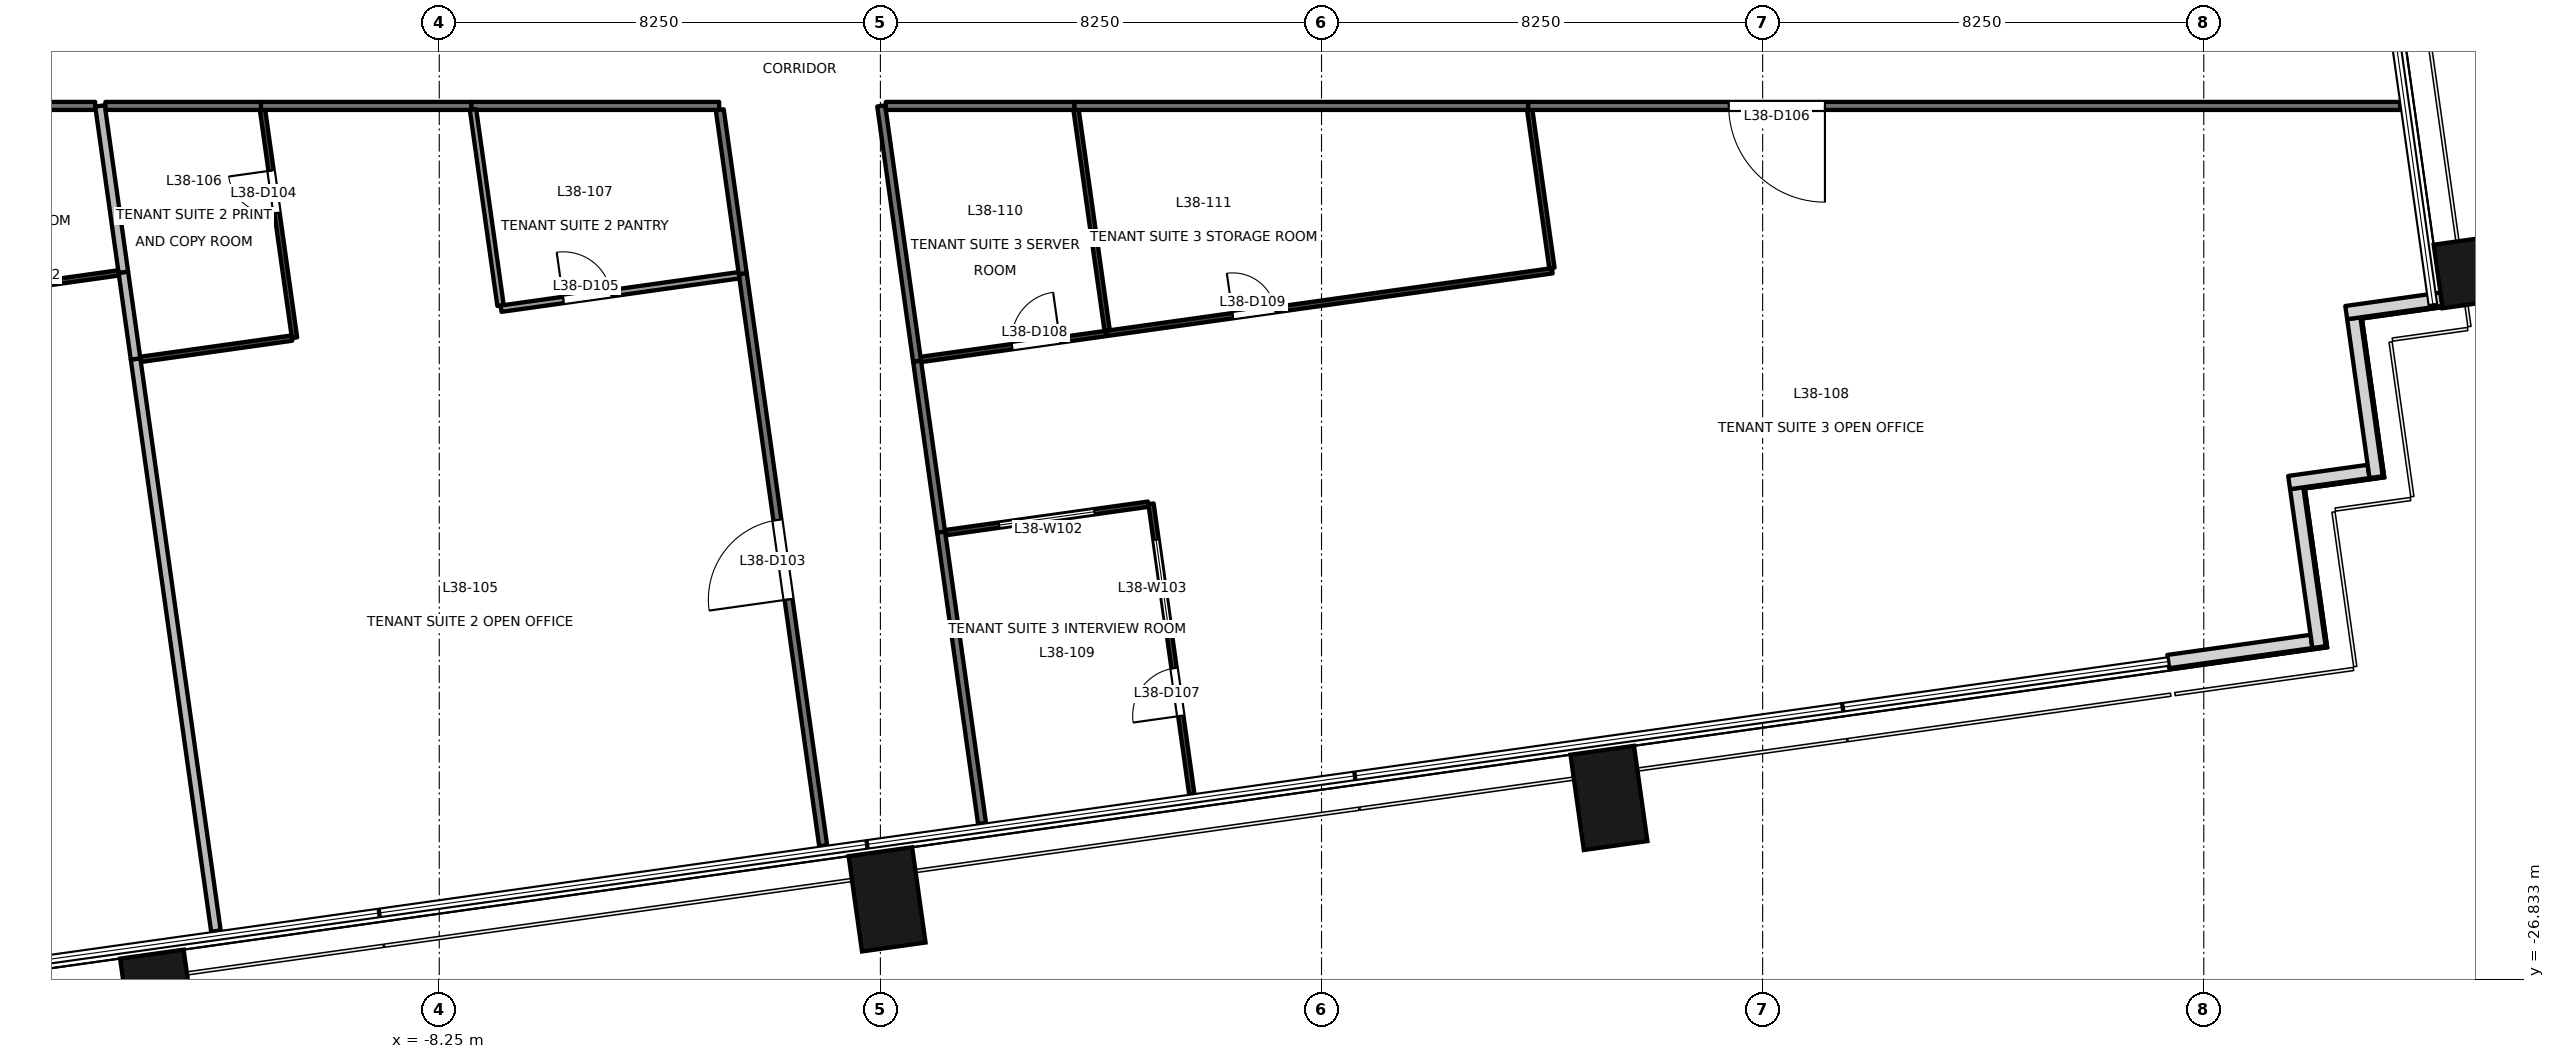
"""IFC4 building model, lengths in metres.
Left out: names, types, materials, properties, quantities, classifications, styles, units other than length and angle.
Written with IfcOpenShell. Run it as: python <this file> out.ifc"""

import sys

from ifc_helpers import new_model, si_unit, direction, frame, frame_2d, origin, origin_2d, place, context, subcontext, project, spatial, rectangle, extrude, element, fill, save


model = new_model("IFC4")
c1 = context("Model", 3, precision=1e-05, world=origin(), true_north=direction((0.0, 1.0)))
c2 = subcontext(c1, "Body", "Model", "MODEL_VIEW")
j1 = project(units=[si_unit("LENGTHUNIT", "METRE"), si_unit("PLANEANGLEUNIT", "RADIAN")], contexts=[c1])
p1 = place(None, origin())
s1 = spatial("IfcSite", under=j1, at=p1, CompositionType="ELEMENT")
p2 = place(p1, origin())
s2 = spatial("IfcBuilding", under=s1, at=p2, CompositionType="ELEMENT")
p3 = place(p2, frame((0.0, 0.0, 168.5)))
s3 = spatial("IfcBuildingStorey", under=s2, at=p3, CompositionType="ELEMENT", Elevation=168.5)
for number, where, z_axis, x_axis in (
    (1, (-13.5, -27.256, -0.2), (0.0, 0.0, 1.0), (0.99, 0.139, 0.0)),
    (2, (0.125, -25.34, -0.2), (0.0, 0.0, 1.0), (0.99, 0.139, 0.0)),
    (3, (13.625, -23.443, -0.2), (0.0, 0.0, 1.0), (0.99, 0.139, 0.0)),
    (4, (30.024, -13.565, -0.2), (0.0, 0.0, 1.0), (-0.139, 0.99, 0.0)),
):
    element("IfcColumn", number, at=place(p3, frame(where, z_axis=z_axis, x_axis=x_axis)), inside=s3, PredefinedType="COLUMN", context=c2, shape_type="SweptSolid", body=[
        extrude(rectangle(XDim=1.2, YDim=1.8, at=origin_2d()), origin(), (0.0, 0.0, 1.0), 3.9),
    ])
p4 = place(p3, frame((24.085, -20.893, 0.0), z_axis=(0.0, 0.0, 1.0), x_axis=(0.990255800966, 0.139260362823, 0.0)))
e5 = element("IfcWall", 5, at=p4, inside=s3, PredefinedType="SOLIDWALL", context=c2, shape_type="SweptSolid", body=[
    extrude(rectangle(XDim=2.705, YDim=0.25, at=frame_2d((1.353, 0.0))), origin(), (0.0, 0.0, 1.0), 3.7),
])
p5 = place(p3, frame((26.905, -20.622, 0.0), z_axis=(0.0, 0.0, 1.0), x_axis=(-0.139313431826, 0.990248336385, 0.0)))
e6 = element("IfcWall", 6, at=p5, inside=s3, PredefinedType="SOLIDWALL", context=c2, shape_type="SweptSolid", body=[
    extrude(rectangle(XDim=3.0, YDim=0.25, at=frame_2d((1.5, 0.0))), origin(), (0.0, 0.0, 1.0), 3.7),
])
p6 = place(p3, frame((26.346, -17.544, 0.0), z_axis=(0.0, 0.0, 1.0), x_axis=(0.990368090482, 0.13845954411, 0.0)))
e7 = element("IfcWall", 7, at=p6, inside=s3, PredefinedType="SOLIDWALL", context=c2, shape_type="SweptSolid", body=[
    extrude(rectangle(XDim=1.5, YDim=0.25, at=frame_2d((0.75, 0.0))), origin(), (0.0, 0.0, 1.0), 3.7),
])
p7 = place(p3, frame((27.973, -17.443, 0.0), z_axis=(0.0, 0.0, 1.0), x_axis=(-0.139313431826, 0.990248336385, 0.0)))
e8 = element("IfcWall", 8, at=p7, inside=s3, PredefinedType="SOLIDWALL", context=c2, shape_type="SweptSolid", body=[
    extrude(rectangle(XDim=3.0, YDim=0.25, at=frame_2d((1.5, 0.0))), origin(), (0.0, 0.0, 1.0), 3.7),
])
p8 = place(p3, frame((27.414, -14.366, 0.0), z_axis=(0.0, 0.0, 1.0), x_axis=(0.990256286673, 0.139256908998, 0.0)))
e9 = element("IfcWall", 9, at=p8, inside=s3, PredefinedType="SOLIDWALL", context=c2, shape_type="SweptSolid", body=[
    extrude(rectangle(XDim=1.801, YDim=0.25, at=frame_2d((0.9, 0.0))), origin(), (0.0, 0.0, 1.0), 3.7),
])
p9 = place(p3, frame((-14.684, -10.5, 0.0), z_axis=(0.0, 0.0, 1.0), x_axis=(-1.0, 0.0, 0.0)))
e10 = element("IfcWall", 10, at=p9, inside=s3, PredefinedType="PARTITIONING", context=c2, shape_type="SweptSolid", body=[
    extrude(rectangle(XDim=4.882, YDim=0.15, at=frame_2d((2.441, 0.0))), origin(), (0.0, 0.0, 1.0), 3.7),
])
p10 = place(p3, frame((-7.648, -10.5, 0.0), z_axis=(0.0, 0.0, 1.0), x_axis=(-1.0, 0.0, 0.0)))
e11 = element("IfcWall", 11, at=p10, inside=s3, PredefinedType="PARTITIONING", context=c2, shape_type="SweptSolid", body=[
    extrude(rectangle(XDim=3.938, YDim=0.15, at=frame_2d((1.969, 0.0))), origin(), (0.0, 0.0, 1.0), 2.8),
])
p11 = place(p3, frame((-1.07, -24.337, 0.0), z_axis=(0.0, 0.0, 1.0), x_axis=(-0.139184552649, 0.990266459244, 0.0)))
e12 = element("IfcWall", 12, at=p11, inside=s3, PredefinedType="PARTITIONING", context=c2, shape_type="SweptSolid", body=[
    extrude(rectangle(XDim=10.805, YDim=0.15, at=frame_2d((5.403, 0.0))), origin(), (0.0, 0.0, 1.0), 3.7),
])
p12 = place(p11, frame((4.652, 0.0, 0.0)))
e13 = element("IfcOpeningElement", 13, at=p12, cuts=e12, PredefinedType="OPENING", context=c2, shape_type="SweptSolid", body=[
    extrude(rectangle(XDim=1.5, YDim=2.1, at=frame_2d((0.75, 1.05))), frame((0.0, 0.085, 0.0), z_axis=(0.0, -1.0, 0.0), x_axis=(1.0, 0.0, 0.0)), (0.0, 0.0, 1.0), 0.171),
])
p13 = place(p3, frame((-11.586, -10.5, 0.0), z_axis=(0.0, 0.0, 1.0), x_axis=(-1.0, 0.0, 0.0)))
e14 = element("IfcWall", 14, at=p13, inside=s3, PredefinedType="PARTITIONING", context=c2, shape_type="SweptSolid", body=[
    extrude(rectangle(XDim=2.908, YDim=0.15, at=frame_2d((1.454, 0.0))), origin(), (0.0, 0.0, 1.0), 2.8),
])
p14 = place(p3, frame((-3.015, -10.5, 0.0), z_axis=(0.0, 0.0, 1.0), x_axis=(-1.0, 0.0, 0.0)))
e15 = element("IfcWall", 15, at=p14, inside=s3, PredefinedType="PARTITIONING", context=c2, shape_type="SweptSolid", body=[
    extrude(rectangle(XDim=4.633, YDim=0.15, at=frame_2d((2.316, 0.0))), origin(), (0.0, 0.0, 1.0), 2.9),
])
p15 = place(p3, frame((-2.574, -13.637, 0.0), z_axis=(0.0, 0.0, 1.0), x_axis=(-0.138957403221, 0.990298359127, 0.0)))
e16 = element("IfcWall", 16, at=p15, inside=s3, PredefinedType="PARTITIONING", context=c2, shape_type="SweptSolid", body=[
    extrude(rectangle(XDim=3.094, YDim=0.15, at=frame_2d((1.547, 0.0))), origin(), (0.0, 0.0, 1.0), 3.7),
])
p16 = place(p3, frame((0.686, -15.273, 0.0), z_axis=(0.0, 0.0, 1.0), x_axis=(0.139242097723, -0.990258369428, 0.0)))
e17 = element("IfcWall", 17, at=p16, inside=s3, PredefinedType="PARTITIONING", context=c2, shape_type="SweptSolid", body=[
    extrude(rectangle(XDim=3.231, YDim=0.15, at=frame_2d((1.616, 0.0))), origin(), (0.0, 0.0, 1.0), 3.7),
])
p17 = place(p3, frame((28.421, -10.5, 0.0), z_axis=(0.0, 0.0, 1.0), x_axis=(-1.0, 0.0, 0.0)))
e18 = element("IfcWall", 18, at=p17, inside=s3, PredefinedType="PARTITIONING", context=c2, shape_type="SweptSolid", body=[
    extrude(rectangle(XDim=16.308, YDim=0.15, at=frame_2d((8.154, 0.0))), origin(), (0.0, 0.0, 1.0), 3.1),
])
p18 = place(p17, frame((10.756, 0.0, 0.0)))
e19 = element("IfcOpeningElement", 19, at=p18, cuts=e18, PredefinedType="OPENING", context=c2, shape_type="SweptSolid", body=[
    extrude(rectangle(XDim=1.8, YDim=2.1, at=frame_2d((0.9, 1.05))), frame((0.0, 0.085, 0.0), z_axis=(0.0, -1.0, 0.0), x_axis=(1.0, 0.0, 0.0)), (0.0, 0.0, 1.0), 0.171),
])
p19 = place(p3, frame((1.136, -18.473, 0.0), z_axis=(0.0, 0.0, 1.0), x_axis=(0.139059647431, -0.990284006968, 0.0)))
e20 = element("IfcWall", 20, at=p19, inside=s3, PredefinedType="PARTITIONING", context=c2, shape_type="SweptSolid", body=[
    extrude(rectangle(XDim=5.5, YDim=0.15, at=frame_2d((2.75, 0.0))), origin(), (0.0, 0.0, 1.0), 3.7),
])
p20 = place(p3, frame((0.015, -10.5, 0.0), z_axis=(0.0, 0.0, 1.0), x_axis=(0.139243966004, -0.990258106723, 0.0)))
e21 = element("IfcWall", 21, at=p20, inside=s3, PredefinedType="PARTITIONING", context=c2, shape_type="SweptSolid", body=[
    extrude(rectangle(XDim=4.82, YDim=0.15, at=frame_2d((2.41, 0.0))), origin(), (0.0, 0.0, 1.0), 2.9),
])
p21 = place(p3, frame((3.63, -10.5, 0.0), z_axis=(0.0, 0.0, 1.0), x_axis=(-1.0, 0.0, 0.0)))
e22 = element("IfcWall", 22, at=p21, inside=s3, PredefinedType="PARTITIONING", context=c2, shape_type="SweptSolid", body=[
    extrude(rectangle(XDim=3.529, YDim=0.15, at=frame_2d((1.764, 0.0))), origin(), (0.0, 0.0, 1.0), 2.9),
])
p22 = place(p3, frame((12.113, -10.5, 0.0), z_axis=(0.0, 0.0, 1.0), x_axis=(-1.0, 0.0, 0.0)))
e23 = element("IfcWall", 23, at=p22, inside=s3, PredefinedType="PARTITIONING", context=c2, shape_type="SweptSolid", body=[
    extrude(rectangle(XDim=8.483, YDim=0.15, at=frame_2d((4.242, 0.0))), origin(), (0.0, 0.0, 1.0), 2.9),
])
p23 = place(p3, frame((-19.013, -14.293, 0.0), z_axis=(0.0, 0.0, 1.0), x_axis=(0.990264556242, 0.139198091406, 0.0)))
e24 = element("IfcWall", 24, at=p23, inside=s3, PredefinedType="PARTITIONING", context=c2, shape_type="SweptSolid", body=[
    extrude(rectangle(XDim=4.813, YDim=0.1, at=frame_2d((2.406, 0.0))), origin(), (0.0, 0.0, 1.0), 3.7),
])
p24 = place(p23, frame((2.709, 0.0, 0.0)))
e25 = element("IfcOpeningElement", 25, at=p24, cuts=e24, PredefinedType="OPENING", context=c2, shape_type="SweptSolid", body=[
    extrude(rectangle(XDim=0.8, YDim=2.1, at=frame_2d((0.4, 1.05))), frame((0.0, 0.061, 0.0), z_axis=(0.0, -1.0, 0.0), x_axis=(1.0, 0.0, 0.0)), (0.0, 0.0, 1.0), 0.121),
])
p25 = place(p3, frame((-13.93, -15.233, 0.0), z_axis=(0.0, 0.0, 1.0), x_axis=(0.139092809985, -0.990279349583, 0.0)))
e26 = element("IfcWall", 26, at=p25, inside=s3, PredefinedType="PARTITIONING", context=c2, shape_type="SweptSolid", body=[
    extrude(rectangle(XDim=10.805, YDim=0.18, at=frame_2d((5.403, 0.0))), origin(), (0.0, 0.0, 1.0), 2.8),
])
p26 = place(p3, frame((-14.158, -13.611, 0.0), z_axis=(0.0, 0.0, 1.0), x_axis=(0.139229707098, -0.990260111618, 0.0)))
e27 = element("IfcWall", 27, at=p26, inside=s3, PredefinedType="PARTITIONING", context=c2, shape_type="SweptSolid", body=[
    extrude(rectangle(XDim=1.638, YDim=0.18, at=frame_2d((0.819, 0.0))), origin(), (0.0, 0.0, 1.0), 3.7),
])
p27 = place(p3, frame((-14.595, -10.5, 0.0), z_axis=(0.0, 0.0, 1.0), x_axis=(0.139103611391, -0.990277832377, 0.0)))
e28 = element("IfcWall", 28, at=p27, inside=s3, PredefinedType="PARTITIONING", context=c2, shape_type="SweptSolid", body=[
    extrude(rectangle(XDim=3.142, YDim=0.18, at=frame_2d((1.571, 0.0))), origin(), (0.0, 0.0, 1.0), 3.7),
])
p28 = place(p3, frame((-13.838, -15.241, 0.0), z_axis=(0.0, 0.0, 1.0), x_axis=(0.990263018372, 0.139209031475, 0.0)))
e29 = element("IfcWall", 29, at=p28, inside=s3, PredefinedType="PARTITIONING", context=c2, shape_type="SweptSolid", body=[
    extrude(rectangle(XDim=2.859, YDim=0.1, at=frame_2d((1.429, 0.0))), origin(), (0.0, 0.0, 1.0), 2.8),
])
p29 = place(p3, frame((-10.957, -14.836, 0.0), z_axis=(0.0, 0.0, 1.0), x_axis=(-0.138962312518, 0.990297670249, 0.0)))
e30 = element("IfcWall", 30, at=p29, inside=s3, PredefinedType="PARTITIONING", context=c2, shape_type="SweptSolid", body=[
    extrude(rectangle(XDim=4.31, YDim=0.1, at=frame_2d((2.155, 0.0))), origin(), (0.0, 0.0, 1.0), 3.7),
])
p30 = place(p29, frame((2.357, 0.0, 0.0)))
e31 = element("IfcOpeningElement", 31, at=p30, cuts=e30, PredefinedType="OPENING", context=c2, shape_type="SweptSolid", body=[
    extrude(rectangle(XDim=0.8, YDim=2.1, at=frame_2d((0.4, 1.05))), frame((0.0, 0.061, 0.0), z_axis=(0.0, -1.0, 0.0), x_axis=(1.0, 0.0, 0.0)), (0.0, 0.0, 1.0), 0.121),
])
p31 = place(p3, frame((-7.619, -10.567, 0.0), z_axis=(0.0, 0.0, 1.0), x_axis=(0.13904874823, -0.990285537416, 0.0)))
e32 = element("IfcWall", 32, at=p31, inside=s3, PredefinedType="PARTITIONING", context=c2, shape_type="SweptSolid", body=[
    extrude(rectangle(XDim=3.703, YDim=0.12, at=frame_2d((1.852, 0.0))), origin(), (0.0, 0.0, 1.0), 3.7),
])
p32 = place(p3, frame((-7.095, -14.293, 0.0), z_axis=(0.0, 0.0, 1.0), x_axis=(0.990250373685, 0.139298949807, 0.0)))
e33 = element("IfcWall", 33, at=p32, inside=s3, PredefinedType="PARTITIONING", context=c2, shape_type="SweptSolid", body=[
    extrude(rectangle(XDim=4.494, YDim=0.12, at=frame_2d((2.247, 0.0))), origin(), (0.0, 0.0, 1.0), 2.9),
])
p33 = place(p32, frame((1.178, 0.0, 0.0)))
e34 = element("IfcOpeningElement", 34, at=p33, cuts=e33, PredefinedType="OPENING", context=c2, shape_type="SweptSolid", body=[
    extrude(rectangle(XDim=0.9, YDim=2.1, at=frame_2d((0.45, 1.05))), frame((0.0, 0.071, 0.0), z_axis=(0.0, -1.0, 0.0), x_axis=(1.0, 0.0, 0.0)), (0.0, 0.0, 1.0), 0.141),
])
p34 = place(p3, frame((5.011, -17.949, 0.0), z_axis=(0.0, 0.0, 1.0), x_axis=(-0.99029781958, -0.138961248322, 0.0)))
e35 = element("IfcWall", 35, at=p34, inside=s3, PredefinedType="PARTITIONING", context=c2, shape_type="SweptSolid", body=[
    extrude(rectangle(XDim=3.835, YDim=0.1, at=frame_2d((1.917, 0.0))), origin(), (0.0, 0.0, 1.0), 2.9),
])
p35 = place(p34, frame((1.018, 0.0, 0.9)))
e36 = element("IfcOpeningElement", 36, at=p35, cuts=e35, PredefinedType="OPENING", context=c2, shape_type="SweptSolid", body=[
    extrude(rectangle(XDim=1.8, YDim=1.2, at=frame_2d((0.9, 0.6))), frame((0.0, 0.061, 0.0), z_axis=(0.0, -1.0, 0.0), x_axis=(1.0, 0.0, 0.0)), (0.0, 0.0, 1.0), 0.121),
])
p36 = place(p3, frame((5.823, -23.368, 0.0), z_axis=(0.0, 0.0, 1.0), x_axis=(-0.13906298859, 0.990283537783, 0.0)))
e37 = element("IfcWall", 37, at=p36, inside=s3, PredefinedType="PARTITIONING", context=c2, shape_type="SweptSolid", body=[
    extrude(rectangle(XDim=5.479, YDim=0.1, at=frame_2d((2.74, 0.0))), origin(), (0.0, 0.0, 1.0), 3.7),
])
p37 = place(p36, frame((1.474, 0.0, 0.0)))
e38 = element("IfcOpeningElement", 38, at=p37, cuts=e37, PredefinedType="OPENING", context=c2, shape_type="SweptSolid", body=[
    extrude(rectangle(XDim=0.9, YDim=2.1, at=frame_2d((0.45, 1.05))), frame((0.0, 0.061, 0.0), z_axis=(0.0, -1.0, 0.0), x_axis=(1.0, 0.0, 0.0)), (0.0, 0.0, 1.0), 0.121),
])
p38 = place(p36, frame((3.002, 0.0, 0.9)))
e39 = element("IfcOpeningElement", 39, at=p38, cuts=e37, PredefinedType="OPENING", context=c2, shape_type="SweptSolid", body=[
    extrude(rectangle(XDim=1.8, YDim=1.2, at=frame_2d((0.9, 0.6))), frame((0.0, 0.061, 0.0), z_axis=(0.0, -1.0, 0.0), x_axis=(1.0, 0.0, 0.0)), (0.0, 0.0, 1.0), 0.121),
])
p39 = place(p3, frame((0.758, -15.242, 0.0), z_axis=(0.0, 0.0, 1.0), x_axis=(0.990292126352, 0.139001814682, 0.0)))
e40 = element("IfcWall", 40, at=p39, inside=s3, PredefinedType="PARTITIONING", context=c2, shape_type="SweptSolid", body=[
    extrude(rectangle(XDim=3.504, YDim=0.1, at=frame_2d((1.752, 0.0))), origin(), (0.0, 0.0, 1.0), 3.7),
])
p40 = place(p39, frame((1.723, 0.0, 0.0)))
e41 = element("IfcOpeningElement", 41, at=p40, cuts=e40, PredefinedType="OPENING", context=c2, shape_type="SweptSolid", body=[
    extrude(rectangle(XDim=0.9, YDim=2.1, at=frame_2d((0.45, 1.05))), frame((0.0, 0.061, 0.0), z_axis=(0.0, -1.0, 0.0), x_axis=(1.0, 0.0, 0.0)), (0.0, 0.0, 1.0), 0.121),
])
p41 = place(p3, frame((4.228, -14.755, 0.0), z_axis=(0.0, 0.0, 1.0), x_axis=(0.990267072018, 0.139180192835, 0.0)))
e42 = element("IfcWall", 42, at=p41, inside=s3, PredefinedType="PARTITIONING", context=c2, shape_type="SweptSolid", body=[
    extrude(rectangle(XDim=8.42, YDim=0.1, at=frame_2d((4.21, 0.0))), origin(), (0.0, 0.0, 1.0), 2.9),
])
p42 = place(p41, frame((2.386, 0.0, 0.0)))
e43 = element("IfcOpeningElement", 43, at=p42, cuts=e42, PredefinedType="OPENING", context=c2, shape_type="SweptSolid", body=[
    extrude(rectangle(XDim=0.8, YDim=2.1, at=frame_2d((0.4, 1.05))), frame((0.0, 0.061, 0.0), z_axis=(0.0, -1.0, 0.0), x_axis=(1.0, 0.0, 0.0)), (0.0, 0.0, 1.0), 0.121),
])
p43 = place(p3, frame((12.559, -13.533, 0.0), z_axis=(0.0, 0.0, 1.0), x_axis=(-0.138954956276, 0.990298702476, 0.0)))
e44 = element("IfcWall", 44, at=p43, inside=s3, PredefinedType="PARTITIONING", context=c2, shape_type="SweptSolid", body=[
    extrude(rectangle(XDim=2.994, YDim=0.1, at=frame_2d((1.497, 0.0))), origin(), (0.0, 0.0, 1.0), 3.7),
])
p44 = place(p3, frame((3.659, -10.568, 0.0), z_axis=(0.0, 0.0, 1.0), x_axis=(0.139423291569, -0.990232874514, 0.0)))
e45 = element("IfcWall", 45, at=p44, inside=s3, PredefinedType="PARTITIONING", context=c2, shape_type="SweptSolid", body=[
    extrude(rectangle(XDim=4.175, YDim=0.1, at=frame_2d((2.087, 0.0))), origin(), (0.0, 0.0, 1.0), 3.7),
])
p45 = place(p12, origin())
e46 = element("IfcDoor", 46, at=p45, inside=s3, OperationType="DOUBLE_DOOR_SINGLE_SWING", PredefinedType="DOOR", context=c2, shape_type="SweptSolid", body=[
    extrude(rectangle(XDim=1.5, YDim=2.1, at=frame_2d((0.75, 1.05))), frame((0.0, 0.025, 0.0), z_axis=(0.0, -1.0, 0.0), x_axis=(1.0, 0.0, 0.0)), (0.0, 0.0, 1.0), 0.05),
])
fill(e13, e46)
p46 = place(p30, origin())
e47 = element("IfcDoor", 47, at=p46, inside=s3, OperationType="SINGLE_SWING_RIGHT", PredefinedType="DOOR", context=c2, shape_type="SweptSolid", body=[
    extrude(rectangle(XDim=0.8, YDim=2.1, at=frame_2d((0.4, 1.05))), frame((0.0, 0.025, 0.0), z_axis=(0.0, -1.0, 0.0), x_axis=(1.0, 0.0, 0.0)), (0.0, 0.0, 1.0), 0.05),
])
fill(e31, e47)
p47 = place(p33, origin())
e48 = element("IfcDoor", 48, at=p47, inside=s3, OperationType="SINGLE_SWING_LEFT", PredefinedType="DOOR", context=c2, shape_type="SweptSolid", body=[
    extrude(rectangle(XDim=0.9, YDim=2.1, at=frame_2d((0.45, 1.05))), frame((0.0, 0.025, 0.0), z_axis=(0.0, -1.0, 0.0), x_axis=(1.0, 0.0, 0.0)), (0.0, 0.0, 1.0), 0.05),
])
fill(e34, e48)
p48 = place(p18, origin())
e49 = element("IfcDoor", 49, at=p48, inside=s3, OperationType="DOUBLE_DOOR_SINGLE_SWING", PredefinedType="DOOR", context=c2, shape_type="SweptSolid", body=[
    extrude(rectangle(XDim=1.8, YDim=2.1, at=frame_2d((0.9, 1.05))), frame((0.0, 0.025, 0.0), z_axis=(0.0, -1.0, 0.0), x_axis=(1.0, 0.0, 0.0)), (0.0, 0.0, 1.0), 0.05),
])
fill(e19, e49)
p49 = place(p37, origin())
e50 = element("IfcDoor", 50, at=p49, inside=s3, OperationType="SINGLE_SWING_LEFT", PredefinedType="DOOR", context=c2, shape_type="SweptSolid", body=[
    extrude(rectangle(XDim=0.9, YDim=2.1, at=frame_2d((0.45, 1.05))), frame((0.0, 0.025, 0.0), z_axis=(0.0, -1.0, 0.0), x_axis=(1.0, 0.0, 0.0)), (0.0, 0.0, 1.0), 0.05),
])
fill(e38, e50)
p50 = place(p40, origin())
e51 = element("IfcDoor", 51, at=p50, inside=s3, OperationType="SINGLE_SWING_RIGHT", PredefinedType="DOOR", context=c2, shape_type="SweptSolid", body=[
    extrude(rectangle(XDim=0.9, YDim=2.1, at=frame_2d((0.45, 1.05))), frame((0.0, 0.025, 0.0), z_axis=(0.0, -1.0, 0.0), x_axis=(1.0, 0.0, 0.0)), (0.0, 0.0, 1.0), 0.05),
])
fill(e41, e51)
p51 = place(p42, origin())
e52 = element("IfcDoor", 52, at=p51, inside=s3, OperationType="SINGLE_SWING_LEFT", PredefinedType="DOOR", context=c2, shape_type="SweptSolid", body=[
    extrude(rectangle(XDim=0.8, YDim=2.1, at=frame_2d((0.4, 1.05))), frame((0.0, 0.025, 0.0), z_axis=(0.0, -1.0, 0.0), x_axis=(1.0, 0.0, 0.0)), (0.0, 0.0, 1.0), 0.05),
])
fill(e43, e52)
p52 = place(p35, origin())
e53 = element("IfcWindow", 53, at=p52, inside=s3, PartitioningType="SINGLE_PANEL", PredefinedType="WINDOW", context=c2, shape_type="SweptSolid", body=[
    extrude(rectangle(XDim=1.8, YDim=1.2, at=frame_2d((0.9, 0.6))), frame((0.0, 0.03, 0.0), z_axis=(0.0, -1.0, 0.0), x_axis=(1.0, 0.0, 0.0)), (0.0, 0.0, 1.0), 0.06),
])
fill(e36, e53)
p53 = place(p38, origin())
e54 = element("IfcWindow", 54, at=p53, inside=s3, PartitioningType="SINGLE_PANEL", PredefinedType="WINDOW", context=c2, shape_type="SweptSolid", body=[
    extrude(rectangle(XDim=1.8, YDim=1.2, at=frame_2d((0.9, 0.6))), frame((0.0, 0.03, 0.0), z_axis=(0.0, -1.0, 0.0), x_axis=(1.0, 0.0, 0.0)), (0.0, 0.0, 1.0), 0.06),
])
fill(e39, e54)
save(model, sys.argv[1])
